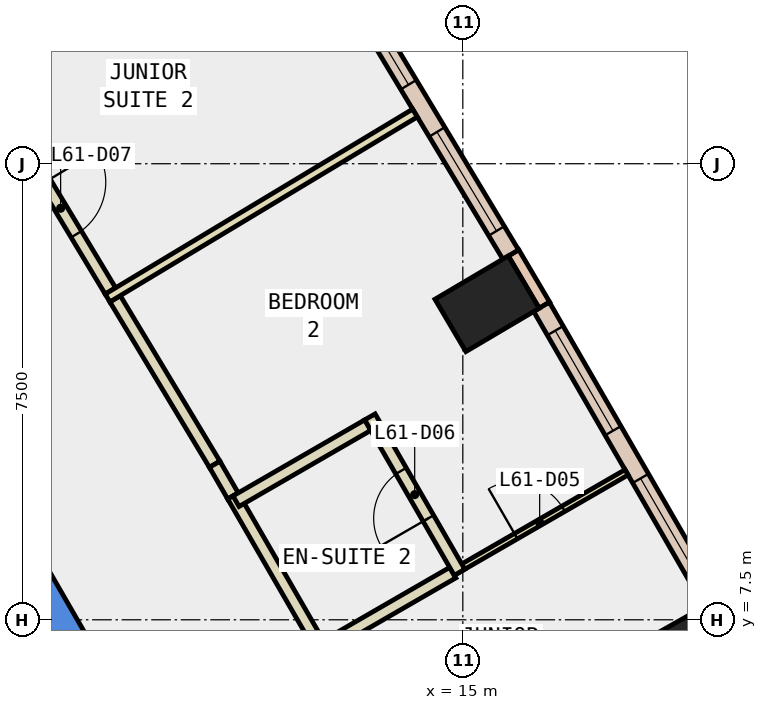
"""IFC4 building model, lengths in metres.
Left out: names, types, materials, properties, quantities, classifications, styles, units other than length and angle.
Written with IfcOpenShell. Run it as: python <this file> out.ifc"""

import sys

from ifc_helpers import new_model, si_unit, direction, frame, frame_2d, origin, origin_2d, place, context, subcontext, project, spatial, polyline, rectangle, outline, extrude, element, fill, save


model = new_model("IFC4")
c1 = context("Model", 3, precision=1e-05, world=origin(), true_north=direction((0.0, 1.0)))
c2 = subcontext(c1, "Body", "Model", "MODEL_VIEW")
j1 = project(units=[si_unit("LENGTHUNIT", "METRE"), si_unit("PLANEANGLEUNIT", "RADIAN")], contexts=[c1])
p1 = place(None, origin())
s1 = spatial("IfcSite", under=j1, at=p1, CompositionType="ELEMENT")
p2 = place(p1, origin())
s2 = spatial("IfcBuilding", under=s1, at=p2, CompositionType="ELEMENT")
p3 = place(p2, frame((0.0, 0.0, 266.6)))
s3 = spatial("IfcBuildingStorey", under=s2, at=p3, CompositionType="ELEMENT", Elevation=266.6)
for number, where, z_axis, x_axis in (
    (1, (18.696, 6.987, -0.34), (0.0, 0.0, 1.0), (-0.491, 0.871, 0.0)),
    (2, (15.399, 12.697, -0.34), (0.0, 0.0, 1.0), (-0.509, 0.861, 0.0)),
):
    element("IfcColumn", number, at=place(p3, frame(where, z_axis=z_axis, x_axis=x_axis)), inside=s3, PredefinedType="COLUMN", context=c2, shape_type="SweptSolid", body=[
        extrude(rectangle(XDim=1.0, YDim=1.4, at=origin_2d()), origin(), (0.0, 0.0, 1.0), 3.6),
    ])
p4 = place(p3, frame((0.0, 0.0, -0.34)))
e3 = element("IfcWall", 3, at=p4, inside=s3, PredefinedType="SHEAR", context=c2, shape_type="SweptSolid", body=[
    extrude(outline(polyline([(6.786, 10.747), (6.266, 10.447), (10.854, 2.5), (11.547, 2.5), (6.786, 10.747)])), origin(), (0.0, 0.0, 1.0), 3.6),
])
p5 = place(p3, frame((16.342, 12.674, 0.0), z_axis=(0.0, 0.0, 1.0), x_axis=(-0.508268432768, 0.861198699634, 0.0)))
e4 = element("IfcWall", 4, at=p5, inside=s3, PredefinedType="STANDARD", context=c2, shape_type="SweptSolid", body=[
    extrude(rectangle(XDim=1.0, YDim=0.2, at=frame_2d((0.5, 0.0))), origin(), (0.0, 0.0, 1.0), 3.26),
])
p6 = place(p3, frame((19.1, 7.787, 0.0), z_axis=(0.0, 0.0, 1.0), x_axis=(-0.500041292042, 0.866001562501, 0.0)))
e5 = element("IfcWall", 5, at=p6, inside=s3, PredefinedType="STANDARD", context=c2, shape_type="SweptSolid", body=[
    extrude(rectangle(XDim=5.612, YDim=0.3, at=frame_2d((2.806, 0.0))), origin(), (0.0, 0.0, 1.0), 3.26),
])
p7 = place(p6, frame((0.453, 0.0, 0.9)))
e6 = element("IfcOpeningElement", 6, at=p7, cuts=e5, PredefinedType="OPENING", context=c2, shape_type="SweptSolid", body=[
    extrude(rectangle(XDim=1.9, YDim=2.0, at=frame_2d((0.95, 1.0))), frame((0.0, 0.16, 0.0), z_axis=(0.0, -1.0, 0.0), x_axis=(1.0, 0.0, 0.0)), (0.0, 0.0, 1.0), 0.32),
])
p8 = place(p6, frame((3.259, 0.0, 0.9)))
e7 = element("IfcOpeningElement", 7, at=p8, cuts=e5, PredefinedType="OPENING", context=c2, shape_type="SweptSolid", body=[
    extrude(rectangle(XDim=1.9, YDim=2.0, at=frame_2d((0.95, 1.0))), frame((0.0, 0.16, 0.0), z_axis=(0.0, -1.0, 0.0), x_axis=(1.0, 0.0, 0.0)), (0.0, 0.0, 1.0), 0.32),
])
p9 = place(p3, frame((15.788, 13.506, 0.0), z_axis=(0.0, 0.0, 1.0), x_axis=(-0.515435742129, 0.856928232547, 0.0)))
e8 = element("IfcWall", 8, at=p9, inside=s3, PredefinedType="STANDARD", context=c2, shape_type="SweptSolid", body=[
    extrude(rectangle(XDim=5.613, YDim=0.3, at=frame_2d((2.806, 0.0))), origin(), (0.0, 0.0, 1.0), 3.26),
])
p10 = place(p9, frame((0.453, 0.0, 0.9)))
e9 = element("IfcOpeningElement", 9, at=p10, cuts=e8, PredefinedType="OPENING", context=c2, shape_type="SweptSolid", body=[
    extrude(rectangle(XDim=1.9, YDim=2.0, at=frame_2d((0.95, 1.0))), frame((0.0, 0.16, 0.0), z_axis=(0.0, -1.0, 0.0), x_axis=(1.0, 0.0, 0.0)), (0.0, 0.0, 1.0), 0.32),
])
p11 = place(p9, frame((3.26, 0.0, 0.9)))
e10 = element("IfcOpeningElement", 10, at=p11, cuts=e8, PredefinedType="OPENING", context=c2, shape_type="SweptSolid", body=[
    extrude(rectangle(XDim=1.9, YDim=2.0, at=frame_2d((0.95, 1.0))), frame((0.0, 0.16, 0.0), z_axis=(0.0, -1.0, 0.0), x_axis=(1.0, 0.0, 0.0)), (0.0, 0.0, 1.0), 0.32),
])
p12 = place(p3, frame((9.281, 12.779, 0.0), z_axis=(0.0, 0.0, 1.0), x_axis=(0.515568955032, -0.856848091908, 0.0)))
e11 = element("IfcWall", 11, at=p12, inside=s3, PredefinedType="PARTITIONING", context=c2, shape_type="SweptSolid", body=[
    extrude(rectangle(XDim=3.177, YDim=0.2, at=frame_2d((1.588, 0.0))), origin(), (0.0, 0.0, 1.0), 3.26),
])
p13 = place(p3, frame((10.919, 10.057, 0.0), z_axis=(0.0, 0.0, 1.0), x_axis=(0.500284357783, -0.865861167485, 0.0)))
e12 = element("IfcWall", 12, at=p13, inside=s3, PredefinedType="PARTITIONING", context=c2, shape_type="SweptSolid", body=[
    extrude(rectangle(XDim=0.602, YDim=0.2, at=frame_2d((0.301, 0.0))), origin(), (0.0, 0.0, 1.0), 3.26),
])
p14 = place(p3, frame((11.22, 9.536, 0.0), z_axis=(0.0, 0.0, 1.0), x_axis=(0.500049511043, -0.865996816683, 0.0)))
e13 = element("IfcWall", 13, at=p14, inside=s3, PredefinedType="PARTITIONING", context=c2, shape_type="SweptSolid", body=[
    extrude(rectangle(XDim=2.8, YDim=0.2, at=frame_2d((1.4, 0.0))), origin(), (0.0, 0.0, 1.0), 3.26),
])
p15 = place(p3, frame((7.567, 15.629, 0.0), z_axis=(0.0, 0.0, 1.0), x_axis=(0.51556943596, -0.856847802532, 0.0)))
e14 = element("IfcWall", 14, at=p15, inside=s3, PredefinedType="PARTITIONING", context=c2, shape_type="SweptSolid", body=[
    extrude(rectangle(XDim=3.176, YDim=0.2, at=frame_2d((1.588, 0.0))), origin(), (0.0, 0.0, 1.0), 3.26),
])
p16 = place(p15, frame((1.088, 0.0, 0.0)))
e15 = element("IfcOpeningElement", 15, at=p16, cuts=e14, PredefinedType="OPENING", context=c2, shape_type="SweptSolid", body=[
    extrude(rectangle(XDim=1.0, YDim=2.1, at=frame_2d((0.5, 1.05))), frame((0.0, 0.11, 0.0), z_axis=(0.0, -1.0, 0.0), x_axis=(1.0, 0.0, 0.0)), (0.0, 0.0, 1.0), 0.22),
])
p17 = place(p3, frame((14.835, 8.275, 0.0), z_axis=(0.0, 0.0, 1.0), x_axis=(0.8660266723, 0.49999780286, 0.0)))
e16 = element("IfcWall", 16, at=p17, inside=s3, PredefinedType="PARTITIONING", context=c2, shape_type="SweptSolid", body=[
    extrude(rectangle(XDim=3.3, YDim=0.1, at=frame_2d((1.65, 0.0))), origin(), (0.0, 0.0, 1.0), 3.26),
])
p18 = place(p17, frame((1.2, 0.0, 0.0)))
e17 = element("IfcOpeningElement", 17, at=p18, cuts=e16, PredefinedType="OPENING", context=c2, shape_type="SweptSolid", body=[
    extrude(rectangle(XDim=0.9, YDim=2.1, at=frame_2d((0.45, 1.05))), frame((0.0, 0.06, 0.0), z_axis=(0.0, -1.0, 0.0), x_axis=(1.0, 0.0, 0.0)), (0.0, 0.0, 1.0), 0.12),
])
p19 = place(p3, frame((12.756, 7.075, 0.0), z_axis=(0.0, 0.0, 1.0), x_axis=(0.866075499611, 0.499913221443, 0.0)))
e18 = element("IfcWall", 18, at=p19, inside=s3, PredefinedType="PARTITIONING", context=c2, shape_type="SweptSolid", body=[
    extrude(rectangle(XDim=2.4, YDim=0.2, at=frame_2d((1.2, 0.0))), origin(), (0.0, 0.0, 1.0), 3.26),
])
p20 = place(p3, frame((14.946, 8.281, 0.0), z_axis=(0.0, 0.0, 1.0), x_axis=(-0.500001826776, 0.866024349092, 0.0)))
e19 = element("IfcWall", 19, at=p20, inside=s3, PredefinedType="PARTITIONING", context=c2, shape_type="SweptSolid", body=[
    extrude(rectangle(XDim=2.95, YDim=0.2, at=frame_2d((1.475, 0.0))), origin(), (0.0, 0.0, 1.0), 3.26),
])
p21 = place(p20, frame((1.025, 0.0, 0.0)))
e20 = element("IfcOpeningElement", 20, at=p21, cuts=e19, PredefinedType="OPENING", context=c2, shape_type="SweptSolid", body=[
    extrude(rectangle(XDim=0.9, YDim=2.1, at=frame_2d((0.45, 1.05))), frame((0.0, 0.11, 0.0), z_axis=(0.0, -1.0, 0.0), x_axis=(1.0, 0.0, 0.0)), (0.0, 0.0, 1.0), 0.22),
])
p22 = place(p3, frame((13.435, 10.7, 0.0), z_axis=(0.0, 0.0, 1.0), x_axis=(-0.866022959057, -0.500004234368, 0.0)))
e21 = element("IfcWall", 21, at=p22, inside=s3, PredefinedType="PARTITIONING", context=c2, shape_type="SweptSolid", body=[
    extrude(rectangle(XDim=2.5, YDim=0.2, at=frame_2d((1.25, 0.0))), origin(), (0.0, 0.0, 1.0), 3.26),
])
p23 = place(p3, frame((9.157, 12.792, 0.0), z_axis=(0.0, 0.0, 1.0), x_axis=(0.856933793276, 0.515426497129, 0.0)))
e22 = element("IfcWall", 22, at=p23, inside=s3, PredefinedType="PARTITIONING", context=c2, shape_type="SweptSolid", body=[
    extrude(rectangle(XDim=5.9, YDim=0.15, at=frame_2d((2.95, 0.0))), origin(), (0.0, 0.0, 1.0), 3.26),
])
p24 = place(p3, frame((8.48, 3.412, 0.0), z_axis=(0.0, 0.0, 1.0), x_axis=(-0.499978703459, 0.866037698999, 0.0)))
e23 = element("IfcWall", 23, at=p24, inside=s3, PredefinedType="STANDARD", context=c2, shape_type="SweptSolid", body=[
    extrude(rectangle(XDim=6.9, YDim=0.2, at=frame_2d((3.45, 0.0))), origin(), (0.0, 0.0, 1.0), 3.26),
])
p25 = place(p7, origin())
e24 = element("IfcWindow", 24, at=p25, inside=s3, PartitioningType="SINGLE_PANEL", PredefinedType="WINDOW", context=c2, shape_type="SweptSolid", body=[
    extrude(rectangle(XDim=1.9, YDim=2.0, at=frame_2d((0.95, 1.0))), frame((0.0, 0.03, 0.0), z_axis=(0.0, -1.0, 0.0), x_axis=(1.0, 0.0, 0.0)), (0.0, 0.0, 1.0), 0.06),
])
fill(e6, e24)
p26 = place(p8, origin())
e25 = element("IfcWindow", 25, at=p26, inside=s3, PartitioningType="SINGLE_PANEL", PredefinedType="WINDOW", context=c2, shape_type="SweptSolid", body=[
    extrude(rectangle(XDim=1.9, YDim=2.0, at=frame_2d((0.95, 1.0))), frame((0.0, 0.03, 0.0), z_axis=(0.0, -1.0, 0.0), x_axis=(1.0, 0.0, 0.0)), (0.0, 0.0, 1.0), 0.06),
])
fill(e7, e25)
p27 = place(p10, origin())
e26 = element("IfcWindow", 26, at=p27, inside=s3, PartitioningType="SINGLE_PANEL", PredefinedType="WINDOW", context=c2, shape_type="SweptSolid", body=[
    extrude(rectangle(XDim=1.9, YDim=2.0, at=frame_2d((0.95, 1.0))), frame((0.0, 0.03, 0.0), z_axis=(0.0, -1.0, 0.0), x_axis=(1.0, 0.0, 0.0)), (0.0, 0.0, 1.0), 0.06),
])
fill(e9, e26)
p28 = place(p11, origin())
e27 = element("IfcWindow", 27, at=p28, inside=s3, PartitioningType="SINGLE_PANEL", PredefinedType="WINDOW", context=c2, shape_type="SweptSolid", body=[
    extrude(rectangle(XDim=1.9, YDim=2.0, at=frame_2d((0.95, 1.0))), frame((0.0, 0.03, 0.0), z_axis=(0.0, -1.0, 0.0), x_axis=(1.0, 0.0, 0.0)), (0.0, 0.0, 1.0), 0.06),
])
fill(e10, e27)
p29 = place(p18, origin())
e28 = element("IfcDoor", 28, at=p29, inside=s3, OperationType="SINGLE_SWING_RIGHT", PredefinedType="DOOR", context=c2, shape_type="SweptSolid", body=[
    extrude(rectangle(XDim=0.9, YDim=2.1, at=frame_2d((0.45, 1.05))), frame((0.0, 0.025, 0.0), z_axis=(0.0, -1.0, 0.0), x_axis=(1.0, 0.0, 0.0)), (0.0, 0.0, 1.0), 0.05),
])
fill(e17, e28)
p30 = place(p21, origin())
e29 = element("IfcDoor", 29, at=p30, inside=s3, OperationType="SINGLE_SWING_LEFT", PredefinedType="DOOR", context=c2, shape_type="SweptSolid", body=[
    extrude(rectangle(XDim=0.9, YDim=2.1, at=frame_2d((0.45, 1.05))), frame((0.0, 0.025, 0.0), z_axis=(0.0, -1.0, 0.0), x_axis=(1.0, 0.0, 0.0)), (0.0, 0.0, 1.0), 0.05),
])
fill(e20, e29)
p31 = place(p16, origin())
e30 = element("IfcDoor", 30, at=p31, inside=s3, OperationType="SINGLE_SWING_RIGHT", PredefinedType="DOOR", context=c2, shape_type="SweptSolid", body=[
    extrude(rectangle(XDim=1.0, YDim=2.1, at=frame_2d((0.5, 1.05))), frame((0.0, 0.025, 0.0), z_axis=(0.0, -1.0, 0.0), x_axis=(1.0, 0.0, 0.0)), (0.0, 0.0, 1.0), 0.05),
])
fill(e15, e30)
save(model, sys.argv[1])
